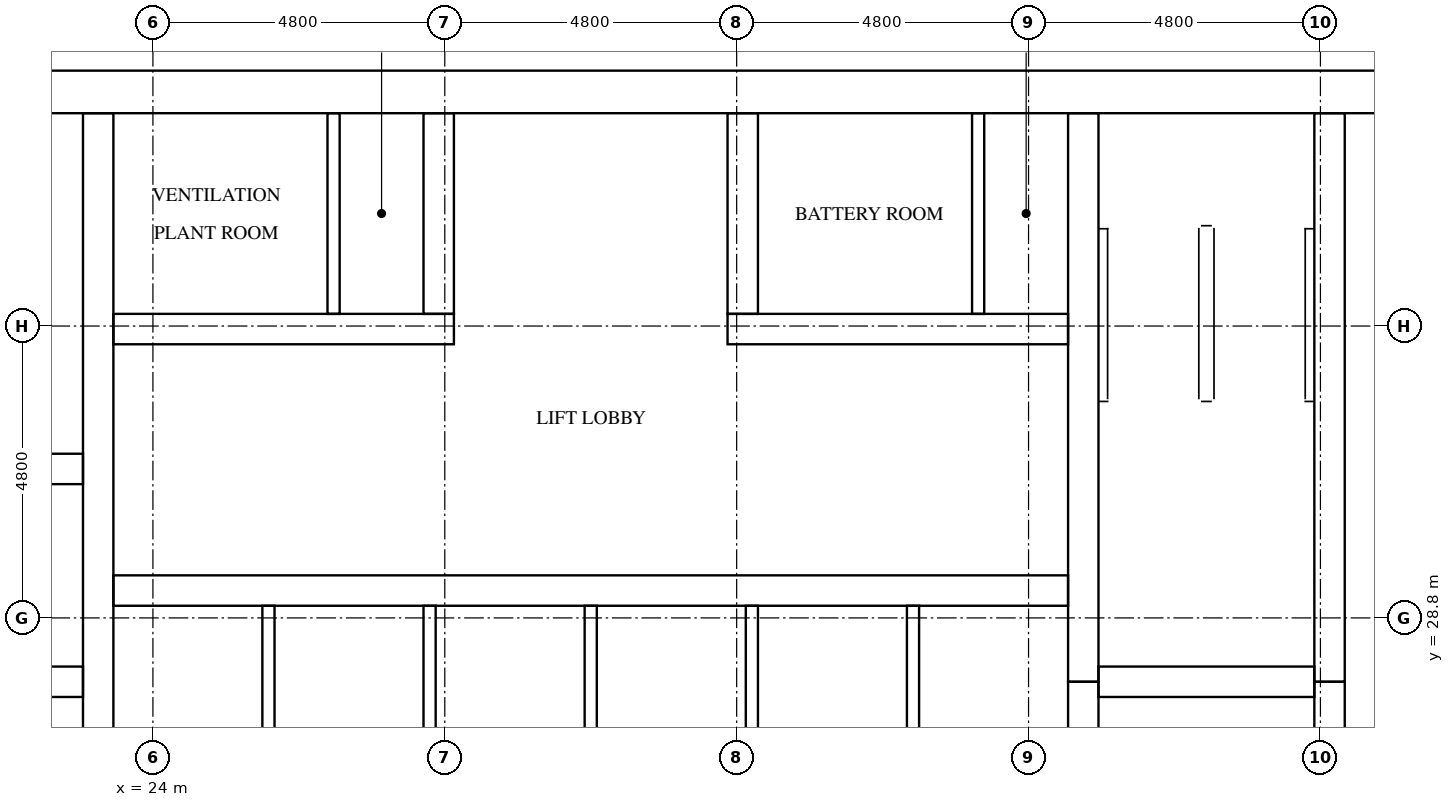
"""IFC4 building model, lengths in metres.
Left out: names, types, materials, properties, quantities, classifications, styles, units other than length and angle.
Written with IfcOpenShell. Run it as: python <this file> out.ifc"""

import sys

from ifc_helpers import new_model, si_unit, direction, frame, frame_2d, origin, place, context, subcontext, project, spatial, rectangle, extrude, element, fill, save


model = new_model("IFC4")
c1 = context("Model", 3, precision=1e-05, world=origin(), true_north=direction((0.0, 1.0)))
c2 = subcontext(c1, "Body", "Model", "MODEL_VIEW")
j1 = project(units=[si_unit("LENGTHUNIT", "METRE"), si_unit("PLANEANGLEUNIT", "RADIAN")], contexts=[c1])
p1 = place(None, origin())
s1 = spatial("IfcSite", under=j1, at=p1, CompositionType="ELEMENT")
p2 = place(p1, origin())
s2 = spatial("IfcBuilding", under=s1, at=p2, CompositionType="ELEMENT")
p3 = place(p2, frame((0.0, 0.0, 215.8)))
s3 = spatial("IfcBuildingStorey", under=s2, at=p3, CompositionType="ELEMENT", Elevation=215.8)
p4 = place(p3, frame((15.0, 37.45, 0.0), z_axis=(0.0, 0.0, 1.0), x_axis=(1.0, 0.0, 0.0)))
e1 = element("IfcWall", 1, at=p4, inside=s3, PredefinedType="SHEAR", context=c2, shape_type="SweptSolid", body=[
    extrude(rectangle(XDim=32.4, YDim=0.7, at=frame_2d((16.2, 0.0))), origin(), (0.0, 0.0, 1.0), 3.2),
])
p5 = place(p4, frame((15.3, 0.0, 0.0)))
e2 = element("IfcOpeningElement", 2, at=p5, cuts=e1, PredefinedType="OPENING", context=c2, shape_type="SweptSolid", body=[
    extrude(rectangle(XDim=1.8, YDim=2.1, at=frame_2d((0.9, 1.05))), frame((0.0, 0.36, 0.0), z_axis=(0.0, -1.0, 0.0), x_axis=(1.0, 0.0, 0.0)), (0.0, 0.0, 1.0), 0.72),
])
p6 = place(p4, frame((1.544, 0.0, 0.0)))
e3 = element("IfcOpeningElement", 3, at=p6, cuts=e1, PredefinedType="OPENING", context=c2, shape_type="SweptSolid", body=[
    extrude(rectangle(XDim=1.0, YDim=2.1, at=frame_2d((0.5, 1.05))), frame((0.0, 0.36, 0.0), z_axis=(0.0, -1.0, 0.0), x_axis=(1.0, 0.0, 0.0)), (0.0, 0.0, 1.0), 0.72),
])
p7 = place(p4, frame((5.219, 0.0, 0.0)))
e4 = element("IfcOpeningElement", 4, at=p7, cuts=e1, PredefinedType="OPENING", context=c2, shape_type="SweptSolid", body=[
    extrude(rectangle(XDim=1.0, YDim=2.1, at=frame_2d((0.5, 1.05))), frame((0.0, 0.36, 0.0), z_axis=(0.0, -1.0, 0.0), x_axis=(1.0, 0.0, 0.0)), (0.0, 0.0, 1.0), 0.72),
])
p8 = place(p3, frame((23.1, 15.7, 0.0), z_axis=(0.0, 0.0, 1.0), x_axis=(0.0, 1.0, 0.0)))
e5 = element("IfcWall", 5, at=p8, inside=s3, PredefinedType="SHEAR", context=c2, shape_type="SweptSolid", body=[
    extrude(rectangle(XDim=21.4, YDim=0.5, at=frame_2d((10.7, 0.0))), origin(), (0.0, 0.0, 1.0), 3.2),
])
p9 = place(p3, frame((39.3, 24.25, 0.0), z_axis=(0.0, 0.0, 1.0), x_axis=(0.0, 1.0, 0.0)))
e6 = element("IfcWall", 6, at=p9, inside=s3, PredefinedType="SHEAR", context=c2, shape_type="SweptSolid", body=[
    extrude(rectangle(XDim=3.5, YDim=0.5, at=frame_2d((1.75, 0.0))), origin(), (0.0, 0.0, 1.0), 3.2),
])
p10 = place(p3, frame((39.3, 27.75, 0.0), z_axis=(0.0, 0.0, 1.0), x_axis=(0.0, 1.0, 0.0)))
e7 = element("IfcWall", 7, at=p10, inside=s3, PredefinedType="SHEAR", context=c2, shape_type="SweptSolid", body=[
    extrude(rectangle(XDim=9.35, YDim=0.5, at=frame_2d((4.675, 0.0))), origin(), (0.0, 0.0, 1.0), 3.2),
])
p11 = place(p3, frame((43.35, 24.25, 0.0), z_axis=(0.0, 0.0, 1.0), x_axis=(0.0, 1.0, 0.0)))
e8 = element("IfcWall", 8, at=p11, inside=s3, PredefinedType="SHEAR", context=c2, shape_type="SweptSolid", body=[
    extrude(rectangle(XDim=3.5, YDim=0.5, at=frame_2d((1.75, 0.0))), origin(), (0.0, 0.0, 1.0), 3.2),
])
p12 = place(p11, frame((1.2, 0.0, 0.0)))
e9 = element("IfcOpeningElement", 9, at=p12, cuts=e8, PredefinedType="OPENING", context=c2, shape_type="SweptSolid", body=[
    extrude(rectangle(XDim=1.1, YDim=2.1, at=frame_2d((0.55, 1.05))), frame((0.0, 0.26, 0.0), z_axis=(0.0, -1.0, 0.0), x_axis=(1.0, 0.0, 0.0)), (0.0, 0.0, 1.0), 0.52),
])
p13 = place(p3, frame((43.35, 27.75, 0.0), z_axis=(0.0, 0.0, 1.0), x_axis=(0.0, 1.0, 0.0)))
e10 = element("IfcWall", 10, at=p13, inside=s3, PredefinedType="SHEAR", context=c2, shape_type="SweptSolid", body=[
    extrude(rectangle(XDim=9.35, YDim=0.5, at=frame_2d((4.675, 0.0))), origin(), (0.0, 0.0, 1.0), 3.2),
])
p14 = place(p13, frame((7.65, 0.0, 0.0)))
e11 = element("IfcOpeningElement", 11, at=p14, cuts=e10, PredefinedType="OPENING", context=c2, shape_type="SweptSolid", body=[
    extrude(rectangle(XDim=1.2, YDim=2.1, at=frame_2d((0.6, 1.05))), frame((0.0, 0.26, 0.0), z_axis=(0.0, -1.0, 0.0), x_axis=(1.0, 0.0, 0.0)), (0.0, 0.0, 1.0), 0.52),
])
p15 = place(p3, frame((19.3, 27.75, 0.0), z_axis=(0.0, 0.0, 1.0), x_axis=(1.0, 0.0, 0.0)))
e12 = element("IfcWall", 12, at=p15, inside=s3, PredefinedType="SHEAR", context=c2, shape_type="SweptSolid", body=[
    extrude(rectangle(XDim=3.55, YDim=0.5, at=frame_2d((1.775, 0.0))), origin(), (0.0, 0.0, 1.0), 3.2),
])
p16 = place(p3, frame((15.7, 31.25, 0.0), z_axis=(0.0, 0.0, 1.0), x_axis=(1.0, 0.0, 0.0)))
e13 = element("IfcWall", 13, at=p16, inside=s3, PredefinedType="SHEAR", context=c2, shape_type="SweptSolid", body=[
    extrude(rectangle(XDim=7.15, YDim=0.5, at=frame_2d((3.575, 0.0))), origin(), (0.0, 0.0, 1.0), 3.2),
])
p17 = place(p3, frame((39.55, 27.75, 0.0), z_axis=(0.0, 0.0, 1.0), x_axis=(1.0, 0.0, 0.0)))
e14 = element("IfcWall", 14, at=p17, inside=s3, PredefinedType="SHEAR", context=c2, shape_type="SweptSolid", body=[
    extrude(rectangle(XDim=3.55, YDim=0.5, at=frame_2d((1.775, 0.0))), origin(), (0.0, 0.0, 1.0), 3.2),
])
p18 = place(p3, frame((23.35, 29.25, 0.0), z_axis=(0.0, 0.0, 1.0), x_axis=(1.0, 0.0, 0.0)))
e15 = element("IfcWall", 15, at=p18, inside=s3, PredefinedType="SHEAR", context=c2, shape_type="SweptSolid", body=[
    extrude(rectangle(XDim=15.7, YDim=0.5, at=frame_2d((7.85, 0.0))), origin(), (0.0, 0.0, 1.0), 3.2),
])
p19 = place(p18, frame((0.675, 0.0, 0.0)))
e16 = element("IfcOpeningElement", 16, at=p19, cuts=e15, PredefinedType="OPENING", context=c2, shape_type="SweptSolid", body=[
    extrude(rectangle(XDim=1.1, YDim=2.1, at=frame_2d((0.55, 1.05))), frame((0.0, 0.26, 0.0), z_axis=(0.0, -1.0, 0.0), x_axis=(1.0, 0.0, 0.0)), (0.0, 0.0, 1.0), 0.52),
])
p20 = place(p18, frame((3.325, 0.0, 0.0)))
e17 = element("IfcOpeningElement", 17, at=p20, cuts=e15, PredefinedType="OPENING", context=c2, shape_type="SweptSolid", body=[
    extrude(rectangle(XDim=1.1, YDim=2.1, at=frame_2d((0.55, 1.05))), frame((0.0, 0.26, 0.0), z_axis=(0.0, -1.0, 0.0), x_axis=(1.0, 0.0, 0.0)), (0.0, 0.0, 1.0), 0.52),
])
p21 = place(p18, frame((5.975, 0.0, 0.0)))
e18 = element("IfcOpeningElement", 18, at=p21, cuts=e15, PredefinedType="OPENING", context=c2, shape_type="SweptSolid", body=[
    extrude(rectangle(XDim=1.1, YDim=2.1, at=frame_2d((0.55, 1.05))), frame((0.0, 0.26, 0.0), z_axis=(0.0, -1.0, 0.0), x_axis=(1.0, 0.0, 0.0)), (0.0, 0.0, 1.0), 0.52),
])
p22 = place(p18, frame((8.625, 0.0, 0.0)))
e19 = element("IfcOpeningElement", 19, at=p22, cuts=e15, PredefinedType="OPENING", context=c2, shape_type="SweptSolid", body=[
    extrude(rectangle(XDim=1.1, YDim=2.1, at=frame_2d((0.55, 1.05))), frame((0.0, 0.26, 0.0), z_axis=(0.0, -1.0, 0.0), x_axis=(1.0, 0.0, 0.0)), (0.0, 0.0, 1.0), 0.52),
])
p23 = place(p18, frame((11.275, 0.0, 0.0)))
e20 = element("IfcOpeningElement", 20, at=p23, cuts=e15, PredefinedType="OPENING", context=c2, shape_type="SweptSolid", body=[
    extrude(rectangle(XDim=1.1, YDim=2.1, at=frame_2d((0.55, 1.05))), frame((0.0, 0.26, 0.0), z_axis=(0.0, -1.0, 0.0), x_axis=(1.0, 0.0, 0.0)), (0.0, 0.0, 1.0), 0.52),
])
p24 = place(p18, frame((13.925, 0.0, 0.0)))
e21 = element("IfcOpeningElement", 21, at=p24, cuts=e15, PredefinedType="OPENING", context=c2, shape_type="SweptSolid", body=[
    extrude(rectangle(XDim=1.1, YDim=2.1, at=frame_2d((0.55, 1.05))), frame((0.0, 0.26, 0.0), z_axis=(0.0, -1.0, 0.0), x_axis=(1.0, 0.0, 0.0)), (0.0, 0.0, 1.0), 0.52),
])
p25 = place(p3, frame((23.35, 33.55, 0.0), z_axis=(0.0, 0.0, 1.0), x_axis=(1.0, 0.0, 0.0)))
e22 = element("IfcWall", 22, at=p25, inside=s3, PredefinedType="SHEAR", context=c2, shape_type="SweptSolid", body=[
    extrude(rectangle(XDim=5.6, YDim=0.5, at=frame_2d((2.8, 0.0))), origin(), (0.0, 0.0, 1.0), 3.2),
])
p26 = place(p25, frame((1.26, 0.0, 0.0)))
e23 = element("IfcOpeningElement", 23, at=p26, cuts=e22, PredefinedType="OPENING", context=c2, shape_type="SweptSolid", body=[
    extrude(rectangle(XDim=1.0, YDim=2.1, at=frame_2d((0.5, 1.05))), frame((0.0, 0.26, 0.0), z_axis=(0.0, -1.0, 0.0), x_axis=(1.0, 0.0, 0.0)), (0.0, 0.0, 1.0), 0.52),
])
p27 = place(p25, frame((3.91, 0.0, 0.0)))
e24 = element("IfcOpeningElement", 24, at=p27, cuts=e22, PredefinedType="OPENING", context=c2, shape_type="SweptSolid", body=[
    extrude(rectangle(XDim=1.0, YDim=2.1, at=frame_2d((0.5, 1.05))), frame((0.0, 0.26, 0.0), z_axis=(0.0, -1.0, 0.0), x_axis=(1.0, 0.0, 0.0)), (0.0, 0.0, 1.0), 0.52),
])
p28 = place(p3, frame((33.45, 33.55, 0.0), z_axis=(0.0, 0.0, 1.0), x_axis=(1.0, 0.0, 0.0)))
e25 = element("IfcWall", 25, at=p28, inside=s3, PredefinedType="SHEAR", context=c2, shape_type="SweptSolid", body=[
    extrude(rectangle(XDim=5.6, YDim=0.5, at=frame_2d((2.8, 0.0))), origin(), (0.0, 0.0, 1.0), 3.2),
])
p29 = place(p28, frame((1.76, 0.0, 0.0)))
e26 = element("IfcOpeningElement", 26, at=p29, cuts=e25, PredefinedType="OPENING", context=c2, shape_type="SweptSolid", body=[
    extrude(rectangle(XDim=1.0, YDim=2.1, at=frame_2d((0.5, 1.05))), frame((0.0, 0.26, 0.0), z_axis=(0.0, -1.0, 0.0), x_axis=(1.0, 0.0, 0.0)), (0.0, 0.0, 1.0), 0.52),
])
p30 = place(p28, frame((4.41, 0.0, 0.0)))
e27 = element("IfcOpeningElement", 27, at=p30, cuts=e25, PredefinedType="OPENING", context=c2, shape_type="SweptSolid", body=[
    extrude(rectangle(XDim=1.0, YDim=2.1, at=frame_2d((0.5, 1.05))), frame((0.0, 0.26, 0.0), z_axis=(0.0, -1.0, 0.0), x_axis=(1.0, 0.0, 0.0)), (0.0, 0.0, 1.0), 0.52),
])
for number, where, z_axis, x_axis in (
    (28, (28.7, 33.8, 0.0), (0.0, 0.0, 1.0), (0.0, 1.0, 0.0)),
    (29, (33.7, 33.8, 0.0), (0.0, 0.0, 1.0), (0.0, 1.0, 0.0)),
):
    element("IfcWall", number, at=place(p3, frame(where, z_axis=z_axis, x_axis=x_axis)), inside=s3, PredefinedType="SHEAR", context=c2, shape_type="SweptSolid", body=[
        extrude(rectangle(XDim=3.3, YDim=0.5, at=frame_2d((1.65, 0.0))), origin(), (0.0, 0.0, 1.0), 3.2),
    ])
for number, where, z_axis, x_axis in (
    (30, (25.9, 26.4, 0.0), (0.0, 0.0, 1.0), (0.0, 1.0, 0.0)),
    (31, (28.55, 26.4, 0.0), (0.0, 0.0, 1.0), (0.0, 1.0, 0.0)),
    (32, (31.2, 26.4, 0.0), (0.0, 0.0, 1.0), (0.0, 1.0, 0.0)),
    (33, (33.85, 26.4, 0.0), (0.0, 0.0, 1.0), (0.0, 1.0, 0.0)),
    (34, (36.5, 26.4, 0.0), (0.0, 0.0, 1.0), (0.0, 1.0, 0.0)),
):
    element("IfcWall", number, at=place(p3, frame(where, z_axis=z_axis, x_axis=x_axis)), inside=s3, PredefinedType="SOLIDWALL", context=c2, shape_type="SweptSolid", body=[
        extrude(rectangle(XDim=2.6, YDim=0.2, at=frame_2d((1.3, 0.0))), origin(), (0.0, 0.0, 1.0), 3.2),
    ])
for number, where, z_axis, x_axis in (
    (35, (26.971, 33.8, 0.0), (0.0, 0.0, 1.0), (0.0, 1.0, 0.0)),
    (36, (37.571, 33.8, 0.0), (0.0, 0.0, 1.0), (0.0, 1.0, 0.0)),
):
    element("IfcWall", number, at=place(p3, frame(where, z_axis=z_axis, x_axis=x_axis)), inside=s3, PredefinedType="PARTITIONING", context=c2, shape_type="SweptSolid", body=[
        extrude(rectangle(XDim=3.3, YDim=0.2, at=frame_2d((1.65, 0.0))), origin(), (0.0, 0.0, 1.0), 3.2),
    ])
p31 = place(p19, origin())
e37 = element("IfcDoor", 37, at=p31, inside=s3, OperationType="DOUBLE_DOOR_SLIDING", PredefinedType="DOOR", context=c2, shape_type="SweptSolid", body=[
    extrude(rectangle(XDim=1.1, YDim=2.1, at=frame_2d((0.55, 1.05))), frame((0.0, 0.025, 0.0), z_axis=(0.0, -1.0, 0.0), x_axis=(1.0, 0.0, 0.0)), (0.0, 0.0, 1.0), 0.05),
])
fill(e16, e37)
p32 = place(p20, origin())
e38 = element("IfcDoor", 38, at=p32, inside=s3, OperationType="DOUBLE_DOOR_SLIDING", PredefinedType="DOOR", context=c2, shape_type="SweptSolid", body=[
    extrude(rectangle(XDim=1.1, YDim=2.1, at=frame_2d((0.55, 1.05))), frame((0.0, 0.025, 0.0), z_axis=(0.0, -1.0, 0.0), x_axis=(1.0, 0.0, 0.0)), (0.0, 0.0, 1.0), 0.05),
])
fill(e17, e38)
p33 = place(p21, origin())
e39 = element("IfcDoor", 39, at=p33, inside=s3, OperationType="DOUBLE_DOOR_SLIDING", PredefinedType="DOOR", context=c2, shape_type="SweptSolid", body=[
    extrude(rectangle(XDim=1.1, YDim=2.1, at=frame_2d((0.55, 1.05))), frame((0.0, 0.025, 0.0), z_axis=(0.0, -1.0, 0.0), x_axis=(1.0, 0.0, 0.0)), (0.0, 0.0, 1.0), 0.05),
])
fill(e18, e39)
p34 = place(p22, origin())
e40 = element("IfcDoor", 40, at=p34, inside=s3, OperationType="DOUBLE_DOOR_SLIDING", PredefinedType="DOOR", context=c2, shape_type="SweptSolid", body=[
    extrude(rectangle(XDim=1.1, YDim=2.1, at=frame_2d((0.55, 1.05))), frame((0.0, 0.025, 0.0), z_axis=(0.0, -1.0, 0.0), x_axis=(1.0, 0.0, 0.0)), (0.0, 0.0, 1.0), 0.05),
])
fill(e19, e40)
p35 = place(p23, origin())
e41 = element("IfcDoor", 41, at=p35, inside=s3, OperationType="DOUBLE_DOOR_SLIDING", PredefinedType="DOOR", context=c2, shape_type="SweptSolid", body=[
    extrude(rectangle(XDim=1.1, YDim=2.1, at=frame_2d((0.55, 1.05))), frame((0.0, 0.025, 0.0), z_axis=(0.0, -1.0, 0.0), x_axis=(1.0, 0.0, 0.0)), (0.0, 0.0, 1.0), 0.05),
])
fill(e20, e41)
p36 = place(p24, origin())
e42 = element("IfcDoor", 42, at=p36, inside=s3, OperationType="DOUBLE_DOOR_SLIDING", PredefinedType="DOOR", context=c2, shape_type="SweptSolid", body=[
    extrude(rectangle(XDim=1.1, YDim=2.1, at=frame_2d((0.55, 1.05))), frame((0.0, 0.025, 0.0), z_axis=(0.0, -1.0, 0.0), x_axis=(1.0, 0.0, 0.0)), (0.0, 0.0, 1.0), 0.05),
])
fill(e21, e42)
p37 = place(p14, origin())
e43 = element("IfcDoor", 43, at=p37, inside=s3, OperationType="SINGLE_SWING_RIGHT", PredefinedType="DOOR", context=c2, shape_type="SweptSolid", body=[
    extrude(rectangle(XDim=1.2, YDim=2.1, at=frame_2d((0.6, 1.05))), frame((0.0, 0.025, 0.0), z_axis=(0.0, -1.0, 0.0), x_axis=(1.0, 0.0, 0.0)), (0.0, 0.0, 1.0), 0.05),
])
fill(e11, e43)
p38 = place(p5, origin())
e44 = element("IfcDoor", 44, at=p38, inside=s3, OperationType="DOUBLE_DOOR_SINGLE_SWING", PredefinedType="DOOR", context=c2, shape_type="SweptSolid", body=[
    extrude(rectangle(XDim=1.8, YDim=2.1, at=frame_2d((0.9, 1.05))), frame((0.0, 0.025, 0.0), z_axis=(0.0, -1.0, 0.0), x_axis=(1.0, 0.0, 0.0)), (0.0, 0.0, 1.0), 0.05),
])
fill(e2, e44)
p39 = place(p26, frame((1.0, 0.0, 0.0), z_axis=(0.0, 0.0, 1.0), x_axis=(-1.0, 0.0, 0.0)))
e45 = element("IfcDoor", 45, at=p39, inside=s3, OperationType="SINGLE_SWING_RIGHT", PredefinedType="DOOR", context=c2, shape_type="SweptSolid", body=[
    extrude(rectangle(XDim=1.0, YDim=2.1, at=frame_2d((0.5, 1.05))), frame((0.0, 0.025, 0.0), z_axis=(0.0, -1.0, 0.0), x_axis=(1.0, 0.0, 0.0)), (0.0, 0.0, 1.0), 0.05),
])
fill(e23, e45)
p40 = place(p27, frame((1.0, 0.0, 0.0), z_axis=(0.0, 0.0, 1.0), x_axis=(-1.0, 0.0, 0.0)))
e46 = element("IfcDoor", 46, at=p40, inside=s3, OperationType="SINGLE_SWING_LEFT", PredefinedType="DOOR", context=c2, shape_type="SweptSolid", body=[
    extrude(rectangle(XDim=1.0, YDim=2.1, at=frame_2d((0.5, 1.05))), frame((0.0, 0.025, 0.0), z_axis=(0.0, -1.0, 0.0), x_axis=(1.0, 0.0, 0.0)), (0.0, 0.0, 1.0), 0.05),
])
fill(e24, e46)
p41 = place(p29, frame((1.0, 0.0, 0.0), z_axis=(0.0, 0.0, 1.0), x_axis=(-1.0, 0.0, 0.0)))
e47 = element("IfcDoor", 47, at=p41, inside=s3, OperationType="SINGLE_SWING_RIGHT", PredefinedType="DOOR", context=c2, shape_type="SweptSolid", body=[
    extrude(rectangle(XDim=1.0, YDim=2.1, at=frame_2d((0.5, 1.05))), frame((0.0, 0.025, 0.0), z_axis=(0.0, -1.0, 0.0), x_axis=(1.0, 0.0, 0.0)), (0.0, 0.0, 1.0), 0.05),
])
fill(e26, e47)
p42 = place(p30, frame((1.0, 0.0, 0.0), z_axis=(0.0, 0.0, 1.0), x_axis=(-1.0, 0.0, 0.0)))
e48 = element("IfcDoor", 48, at=p42, inside=s3, OperationType="SINGLE_SWING_LEFT", PredefinedType="DOOR", context=c2, shape_type="SweptSolid", body=[
    extrude(rectangle(XDim=1.0, YDim=2.1, at=frame_2d((0.5, 1.05))), frame((0.0, 0.025, 0.0), z_axis=(0.0, -1.0, 0.0), x_axis=(1.0, 0.0, 0.0)), (0.0, 0.0, 1.0), 0.05),
])
fill(e27, e48)
save(model, sys.argv[1])
